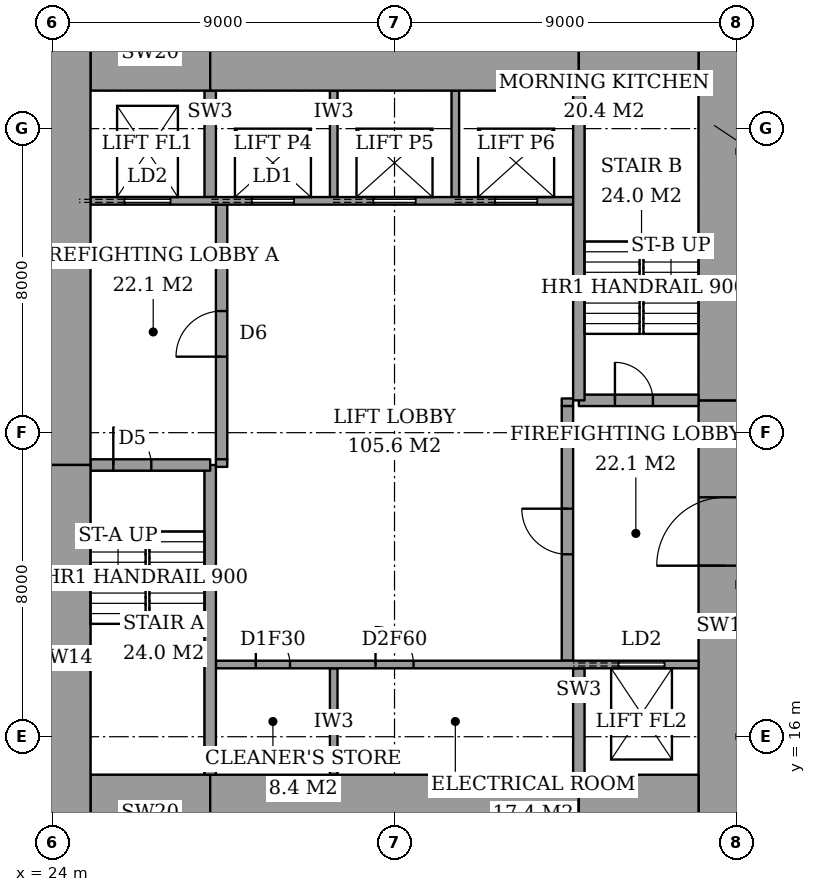
"""IFC4 building model, lengths in metres.
Left out: names, types, materials, properties, quantities, classifications, styles, units other than length and angle.
Written with IfcOpenShell. Run it as: python <this file> out.ifc"""

import sys

from ifc_helpers import new_model, si_unit, direction, frame, frame_2d, origin, place, context, subcontext, project, spatial, rectangle, extrude, element, fill, save


model = new_model("IFC4")
c1 = context("Model", 3, precision=1e-05, world=origin(), true_north=direction((0.0, 1.0)))
c2 = subcontext(c1, "Body", "Model", "MODEL_VIEW")
j1 = project(units=[si_unit("LENGTHUNIT", "METRE"), si_unit("PLANEANGLEUNIT", "RADIAN")], contexts=[c1])
p1 = place(None, origin())
s1 = spatial("IfcSite", under=j1, at=p1, CompositionType="ELEMENT")
p2 = place(p1, origin())
s2 = spatial("IfcBuilding", under=s1, at=p2, CompositionType="ELEMENT")
p3 = place(p2, frame((0.0, 0.0, 273.6)))
s3 = spatial("IfcBuildingStorey", under=s2, at=p3, CompositionType="ELEMENT", Elevation=273.6)
p4 = place(p3, frame((25.0, 14.0, 0.0), z_axis=(0.0, 0.0, 1.0), x_axis=(1.0, 0.0, 0.0)))
e1 = element("IfcWall", 1, at=p4, inside=s3, PredefinedType="SHEAR", context=c2, shape_type="SweptSolid", body=[
    extrude(rectangle(XDim=3.15, YDim=2.0, at=frame_2d((1.575, 0.0))), origin(), (0.0, 0.0, 1.0), 3.6),
])
p5 = place(p3, frame((28.15, 14.0, 0.0), z_axis=(0.0, 0.0, 1.0), x_axis=(1.0, 0.0, 0.0)))
e2 = element("IfcWall", 2, at=p5, inside=s3, PredefinedType="SHEAR", context=c2, shape_type="SweptSolid", body=[
    extrude(rectangle(XDim=9.7, YDim=2.0, at=frame_2d((4.85, 0.0))), origin(), (0.0, 0.0, 1.0), 3.6),
])
for number, where, z_axis, x_axis in (
    (3, (37.85, 14.0, 0.0), (0.0, 0.0, 1.0), (1.0, 0.0, 0.0)),
    (4, (25.0, 34.0, 0.0), (0.0, 0.0, 1.0), (1.0, 0.0, 0.0)),
):
    element("IfcWall", number, at=place(p3, frame(where, z_axis=z_axis, x_axis=x_axis)), inside=s3, PredefinedType="SHEAR", context=c2, shape_type="SweptSolid", body=[
        extrude(rectangle(XDim=3.15, YDim=2.0, at=frame_2d((1.575, 0.0))), origin(), (0.0, 0.0, 1.0), 3.6),
    ])
p6 = place(p3, frame((28.15, 34.0, 0.0), z_axis=(0.0, 0.0, 1.0), x_axis=(1.0, 0.0, 0.0)))
e5 = element("IfcWall", 5, at=p6, inside=s3, PredefinedType="SHEAR", context=c2, shape_type="SweptSolid", body=[
    extrude(rectangle(XDim=9.7, YDim=2.0, at=frame_2d((4.85, 0.0))), origin(), (0.0, 0.0, 1.0), 3.6),
])
p7 = place(p3, frame((37.85, 34.0, 0.0), z_axis=(0.0, 0.0, 1.0), x_axis=(1.0, 0.0, 0.0)))
e6 = element("IfcWall", 6, at=p7, inside=s3, PredefinedType="SHEAR", context=c2, shape_type="SweptSolid", body=[
    extrude(rectangle(XDim=3.15, YDim=2.0, at=frame_2d((1.575, 0.0))), origin(), (0.0, 0.0, 1.0), 3.6),
])
p8 = place(p3, frame((24.3, 13.0, 0.0), z_axis=(0.0, 0.0, 1.0), x_axis=(0.0, 1.0, 0.0)))
e7 = element("IfcWall", 7, at=p8, inside=s3, PredefinedType="SHEAR", context=c2, shape_type="SweptSolid", body=[
    extrude(rectangle(XDim=10.15, YDim=1.4, at=frame_2d((5.075, 0.0))), origin(), (0.0, 0.0, 1.0), 3.6),
])
p9 = place(p3, frame((24.3, 23.15, 0.0), z_axis=(0.0, 0.0, 1.0), x_axis=(0.0, 1.0, 0.0)))
e8 = element("IfcWall", 8, at=p9, inside=s3, PredefinedType="SHEAR", context=c2, shape_type="SweptSolid", body=[
    extrude(rectangle(XDim=11.85, YDim=1.4, at=frame_2d((5.925, 0.0))), origin(), (0.0, 0.0, 1.0), 3.6),
])
p10 = place(p3, frame((41.7, 13.0, 0.0), z_axis=(0.0, 0.0, 1.0), x_axis=(0.0, 1.0, 0.0)))
e9 = element("IfcWall", 9, at=p10, inside=s3, PredefinedType="SHEAR", context=c2, shape_type="SweptSolid", body=[
    extrude(rectangle(XDim=11.85, YDim=1.4, at=frame_2d((5.925, 0.0))), origin(), (0.0, 0.0, 1.0), 3.6),
])
p11 = place(p10, frame((7.5, 0.0, 0.0)))
e10 = element("IfcOpeningElement", 10, at=p11, cuts=e9, PredefinedType="OPENING", context=c2, shape_type="SweptSolid", body=[
    extrude(rectangle(XDim=1.8, YDim=2.4, at=frame_2d((0.9, 1.2))), frame((0.0, 0.71, 0.0), z_axis=(0.0, -1.0, 0.0), x_axis=(1.0, 0.0, 0.0)), (0.0, 0.0, 1.0), 1.42),
])
p12 = place(p3, frame((41.7, 24.85, 0.0), z_axis=(0.0, 0.0, 1.0), x_axis=(0.0, 1.0, 0.0)))
e11 = element("IfcWall", 11, at=p12, inside=s3, PredefinedType="SHEAR", context=c2, shape_type="SweptSolid", body=[
    extrude(rectangle(XDim=10.15, YDim=1.4, at=frame_2d((5.075, 0.0))), origin(), (0.0, 0.0, 1.0), 3.6),
])
p13 = place(p3, frame((28.15, 15.0, 0.0), z_axis=(0.0, 0.0, 1.0), x_axis=(0.0, 1.0, 0.0)))
e12 = element("IfcWall", 12, at=p13, inside=s3, PredefinedType="SHEAR", context=c2, shape_type="SweptSolid", body=[
    extrude(rectangle(XDim=8.15, YDim=0.3, at=frame_2d((4.075, 0.0))), origin(), (0.0, 0.0, 1.0), 3.6),
])
p14 = place(p3, frame((25.0, 23.15, 0.0), z_axis=(0.0, 0.0, 1.0), x_axis=(1.0, 0.0, 0.0)))
e13 = element("IfcWall", 13, at=p14, inside=s3, PredefinedType="SHEAR", context=c2, shape_type="SweptSolid", body=[
    extrude(rectangle(XDim=3.15, YDim=0.3, at=frame_2d((1.575, 0.0))), origin(), (0.0, 0.0, 1.0), 3.6),
])
p15 = place(p14, frame((0.6, 0.0, 0.0)))
e14 = element("IfcOpeningElement", 14, at=p15, cuts=e13, PredefinedType="OPENING", context=c2, shape_type="SweptSolid", body=[
    extrude(rectangle(XDim=1.0, YDim=2.1, at=frame_2d((0.5, 1.05))), frame((0.0, 0.16, 0.0), z_axis=(0.0, -1.0, 0.0), x_axis=(1.0, 0.0, 0.0)), (0.0, 0.0, 1.0), 0.32),
])
p16 = place(p3, frame((37.85, 24.85, 0.0), z_axis=(0.0, 0.0, 1.0), x_axis=(0.0, 1.0, 0.0)))
e15 = element("IfcWall", 15, at=p16, inside=s3, PredefinedType="SHEAR", context=c2, shape_type="SweptSolid", body=[
    extrude(rectangle(XDim=8.15, YDim=0.3, at=frame_2d((4.075, 0.0))), origin(), (0.0, 0.0, 1.0), 3.6),
])
p17 = place(p3, frame((37.85, 24.85, 0.0), z_axis=(0.0, 0.0, 1.0), x_axis=(1.0, 0.0, 0.0)))
e16 = element("IfcWall", 16, at=p17, inside=s3, PredefinedType="SHEAR", context=c2, shape_type="SweptSolid", body=[
    extrude(rectangle(XDim=3.15, YDim=0.3, at=frame_2d((1.575, 0.0))), origin(), (0.0, 0.0, 1.0), 3.6),
])
p18 = place(p17, frame((0.95, 0.0, 0.0)))
e17 = element("IfcOpeningElement", 17, at=p18, cuts=e16, PredefinedType="OPENING", context=c2, shape_type="SweptSolid", body=[
    extrude(rectangle(XDim=1.0, YDim=2.1, at=frame_2d((0.5, 1.05))), frame((0.0, 0.16, 0.0), z_axis=(0.0, -1.0, 0.0), x_axis=(1.0, 0.0, 0.0)), (0.0, 0.0, 1.0), 0.32),
])
p19 = place(p3, frame((28.45, 23.3, 0.0), z_axis=(0.0, 0.0, 1.0), x_axis=(0.0, 1.0, 0.0)))
e18 = element("IfcWall", 18, at=p19, inside=s3, PredefinedType="PARTITIONING", context=c2, shape_type="SweptSolid", body=[
    extrude(rectangle(XDim=6.7, YDim=0.3, at=frame_2d((3.35, 0.0))), origin(), (0.0, 0.0, 1.0), 3.6),
])
p20 = place(p19, frame((2.7, 0.0, 0.0)))
e19 = element("IfcOpeningElement", 19, at=p20, cuts=e18, PredefinedType="OPENING", context=c2, shape_type="SweptSolid", body=[
    extrude(rectangle(XDim=1.2, YDim=2.1, at=frame_2d((0.6, 1.05))), frame((0.0, 0.16, 0.0), z_axis=(0.0, -1.0, 0.0), x_axis=(1.0, 0.0, 0.0)), (0.0, 0.0, 1.0), 0.32),
])
p21 = place(p3, frame((37.55, 18.0, 0.0), z_axis=(0.0, 0.0, 1.0), x_axis=(0.0, 1.0, 0.0)))
e20 = element("IfcWall", 20, at=p21, inside=s3, PredefinedType="PARTITIONING", context=c2, shape_type="SweptSolid", body=[
    extrude(rectangle(XDim=6.7, YDim=0.3, at=frame_2d((3.35, 0.0))), origin(), (0.0, 0.0, 1.0), 3.6),
])
p22 = place(p21, frame((2.8, 0.0, 0.0)))
e21 = element("IfcOpeningElement", 21, at=p22, cuts=e20, PredefinedType="OPENING", context=c2, shape_type="SweptSolid", body=[
    extrude(rectangle(XDim=1.2, YDim=2.1, at=frame_2d((0.6, 1.05))), frame((0.0, 0.16, 0.0), z_axis=(0.0, -1.0, 0.0), x_axis=(1.0, 0.0, 0.0)), (0.0, 0.0, 1.0), 0.32),
])
p23 = place(p3, frame((28.3, 17.9, 0.0), z_axis=(0.0, 0.0, 1.0), x_axis=(1.0, 0.0, 0.0)))
e22 = element("IfcWall", 22, at=p23, inside=s3, PredefinedType="PARTITIONING", context=c2, shape_type="SweptSolid", body=[
    extrude(rectangle(XDim=12.7, YDim=0.2, at=frame_2d((6.35, 0.0))), origin(), (0.0, 0.0, 1.0), 3.6),
])
p24 = place(p23, frame((1.05, 0.0, 0.0)))
e23 = element("IfcOpeningElement", 23, at=p24, cuts=e22, PredefinedType="OPENING", context=c2, shape_type="SweptSolid", body=[
    extrude(rectangle(XDim=0.9, YDim=2.1, at=frame_2d((0.45, 1.05))), frame((0.0, 0.11, 0.0), z_axis=(0.0, -1.0, 0.0), x_axis=(1.0, 0.0, 0.0)), (0.0, 0.0, 1.0), 0.22),
])
p25 = place(p23, frame((4.2, 0.0, 0.0)))
e24 = element("IfcOpeningElement", 24, at=p25, cuts=e22, PredefinedType="OPENING", context=c2, shape_type="SweptSolid", body=[
    extrude(rectangle(XDim=1.0, YDim=2.1, at=frame_2d((0.5, 1.05))), frame((0.0, 0.11, 0.0), z_axis=(0.0, -1.0, 0.0), x_axis=(1.0, 0.0, 0.0)), (0.0, 0.0, 1.0), 0.22),
])
p26 = place(p23, frame((10.6, 0.0, 0.0)))
e25 = element("IfcOpeningElement", 25, at=p26, cuts=e22, PredefinedType="OPENING", context=c2, shape_type="SweptSolid", body=[
    extrude(rectangle(XDim=1.2, YDim=2.1, at=frame_2d((0.6, 1.05))), frame((0.0, 0.11, 0.0), z_axis=(0.0, -1.0, 0.0), x_axis=(1.0, 0.0, 0.0)), (0.0, 0.0, 1.0), 0.22),
])
p27 = place(p3, frame((25.0, 30.1, 0.0), z_axis=(0.0, 0.0, 1.0), x_axis=(1.0, 0.0, 0.0)))
e26 = element("IfcWall", 26, at=p27, inside=s3, PredefinedType="PARTITIONING", context=c2, shape_type="SweptSolid", body=[
    extrude(rectangle(XDim=12.7, YDim=0.2, at=frame_2d((6.35, 0.0))), origin(), (0.0, 0.0, 1.0), 3.6),
])
p28 = place(p27, frame((4.25, 0.0, 0.0)))
e27 = element("IfcOpeningElement", 27, at=p28, cuts=e26, PredefinedType="OPENING", context=c2, shape_type="SweptSolid", body=[
    extrude(rectangle(XDim=1.1, YDim=2.1, at=frame_2d((0.55, 1.05))), frame((0.0, 0.11, 0.0), z_axis=(0.0, -1.0, 0.0), x_axis=(1.0, 0.0, 0.0)), (0.0, 0.0, 1.0), 0.22),
])
p29 = place(p27, frame((7.45, 0.0, 0.0)))
e28 = element("IfcOpeningElement", 28, at=p29, cuts=e26, PredefinedType="OPENING", context=c2, shape_type="SweptSolid", body=[
    extrude(rectangle(XDim=1.1, YDim=2.1, at=frame_2d((0.55, 1.05))), frame((0.0, 0.11, 0.0), z_axis=(0.0, -1.0, 0.0), x_axis=(1.0, 0.0, 0.0)), (0.0, 0.0, 1.0), 0.22),
])
p30 = place(p27, frame((10.65, 0.0, 0.0)))
e29 = element("IfcOpeningElement", 29, at=p30, cuts=e26, PredefinedType="OPENING", context=c2, shape_type="SweptSolid", body=[
    extrude(rectangle(XDim=1.1, YDim=2.1, at=frame_2d((0.55, 1.05))), frame((0.0, 0.11, 0.0), z_axis=(0.0, -1.0, 0.0), x_axis=(1.0, 0.0, 0.0)), (0.0, 0.0, 1.0), 0.22),
])
p31 = place(p27, frame((0.9, 0.0, 0.0)))
e30 = element("IfcOpeningElement", 30, at=p31, cuts=e26, PredefinedType="OPENING", context=c2, shape_type="SweptSolid", body=[
    extrude(rectangle(XDim=1.2, YDim=2.1, at=frame_2d((0.6, 1.05))), frame((0.0, 0.11, 0.0), z_axis=(0.0, -1.0, 0.0), x_axis=(1.0, 0.0, 0.0)), (0.0, 0.0, 1.0), 0.22),
])
p32 = place(p3, frame((31.4, 15.0, 0.0), z_axis=(0.0, 0.0, 1.0), x_axis=(0.0, 1.0, 0.0)))
e31 = element("IfcWall", 31, at=p32, inside=s3, PredefinedType="PARTITIONING", context=c2, shape_type="SweptSolid", body=[
    extrude(rectangle(XDim=2.8, YDim=0.2, at=frame_2d((1.4, 0.0))), origin(), (0.0, 0.0, 1.0), 3.6),
])
p33 = place(p3, frame((37.85, 15.0, 0.0), z_axis=(0.0, 0.0, 1.0), x_axis=(0.0, 1.0, 0.0)))
e32 = element("IfcWall", 32, at=p33, inside=s3, PredefinedType="SHEAR", context=c2, shape_type="SweptSolid", body=[
    extrude(rectangle(XDim=2.8, YDim=0.3, at=frame_2d((1.4, 0.0))), origin(), (0.0, 0.0, 1.0), 3.6),
])
for number, where, z_axis, x_axis in (
    (33, (31.4, 30.2, 0.0), (0.0, 0.0, 1.0), (0.0, 1.0, 0.0)),
    (34, (34.6, 30.2, 0.0), (0.0, 0.0, 1.0), (0.0, 1.0, 0.0)),
):
    element("IfcWall", number, at=place(p3, frame(where, z_axis=z_axis, x_axis=x_axis)), inside=s3, PredefinedType="PARTITIONING", context=c2, shape_type="SweptSolid", body=[
        extrude(rectangle(XDim=2.8, YDim=0.2, at=frame_2d((1.4, 0.0))), origin(), (0.0, 0.0, 1.0), 3.6),
    ])
p34 = place(p3, frame((28.15, 30.2, 0.0), z_axis=(0.0, 0.0, 1.0), x_axis=(0.0, 1.0, 0.0)))
e35 = element("IfcWall", 35, at=p34, inside=s3, PredefinedType="SHEAR", context=c2, shape_type="SweptSolid", body=[
    extrude(rectangle(XDim=2.8, YDim=0.3, at=frame_2d((1.4, 0.0))), origin(), (0.0, 0.0, 1.0), 3.6),
])
for number, where, z_axis, x_axis in (
    (36, (28.3, 23.2, 0.0), (0.0, 0.0, 1.0), (1.0, 0.0, 0.0)),
    (37, (37.4, 24.8, 0.0), (0.0, 0.0, 1.0), (1.0, 0.0, 0.0)),
):
    element("IfcWall", number, at=place(p3, frame(where, z_axis=z_axis, x_axis=x_axis)), inside=s3, PredefinedType="PARTITIONING", context=c2, shape_type="SweptSolid", body=[
        extrude(rectangle(XDim=0.3, YDim=0.2, at=frame_2d((0.15, 0.0))), origin(), (0.0, 0.0, 1.0), 3.6),
    ])
p35 = place(p15, origin())
e38 = element("IfcDoor", 38, at=p35, inside=s3, OperationType="SINGLE_SWING_RIGHT", PredefinedType="DOOR", context=c2, shape_type="SweptSolid", body=[
    extrude(rectangle(XDim=1.0, YDim=2.1, at=frame_2d((0.5, 1.05))), frame((0.0, 0.025, 0.0), z_axis=(0.0, -1.0, 0.0), x_axis=(1.0, 0.0, 0.0)), (0.0, 0.0, 1.0), 0.05),
])
fill(e14, e38)
p36 = place(p18, origin())
e39 = element("IfcDoor", 39, at=p36, inside=s3, OperationType="SINGLE_SWING_RIGHT", PredefinedType="DOOR", context=c2, shape_type="SweptSolid", body=[
    extrude(rectangle(XDim=1.0, YDim=2.1, at=frame_2d((0.5, 1.05))), frame((0.0, 0.025, 0.0), z_axis=(0.0, -1.0, 0.0), x_axis=(1.0, 0.0, 0.0)), (0.0, 0.0, 1.0), 0.05),
])
fill(e17, e39)
p37 = place(p20, origin())
e40 = element("IfcDoor", 40, at=p37, inside=s3, OperationType="SINGLE_SWING_RIGHT", PredefinedType="DOOR", context=c2, shape_type="SweptSolid", body=[
    extrude(rectangle(XDim=1.2, YDim=2.1, at=frame_2d((0.6, 1.05))), frame((0.0, 0.025, 0.0), z_axis=(0.0, -1.0, 0.0), x_axis=(1.0, 0.0, 0.0)), (0.0, 0.0, 1.0), 0.05),
])
fill(e19, e40)
p38 = place(p22, origin())
e41 = element("IfcDoor", 41, at=p38, inside=s3, OperationType="SINGLE_SWING_LEFT", PredefinedType="DOOR", context=c2, shape_type="SweptSolid", body=[
    extrude(rectangle(XDim=1.2, YDim=2.1, at=frame_2d((0.6, 1.05))), frame((0.0, 0.025, 0.0), z_axis=(0.0, -1.0, 0.0), x_axis=(1.0, 0.0, 0.0)), (0.0, 0.0, 1.0), 0.05),
])
fill(e21, e41)
p39 = place(p11, origin())
e42 = element("IfcDoor", 42, at=p39, inside=s3, OperationType="DOUBLE_DOOR_DOUBLE_SWING", PredefinedType="DOOR", context=c2, shape_type="SweptSolid", body=[
    extrude(rectangle(XDim=1.8, YDim=2.4, at=frame_2d((0.9, 1.2))), frame((0.0, 0.025, 0.0), z_axis=(0.0, -1.0, 0.0), x_axis=(1.0, 0.0, 0.0)), (0.0, 0.0, 1.0), 0.05),
])
fill(e10, e42)
p40 = place(p24, origin())
e43 = element("IfcDoor", 43, at=p40, inside=s3, OperationType="SINGLE_SWING_RIGHT", PredefinedType="DOOR", context=c2, shape_type="SweptSolid", body=[
    extrude(rectangle(XDim=0.9, YDim=2.1, at=frame_2d((0.45, 1.05))), frame((0.0, 0.025, 0.0), z_axis=(0.0, -1.0, 0.0), x_axis=(1.0, 0.0, 0.0)), (0.0, 0.0, 1.0), 0.05),
])
fill(e23, e43)
p41 = place(p25, origin())
e44 = element("IfcDoor", 44, at=p41, inside=s3, OperationType="SINGLE_SWING_RIGHT", PredefinedType="DOOR", context=c2, shape_type="SweptSolid", body=[
    extrude(rectangle(XDim=1.0, YDim=2.1, at=frame_2d((0.5, 1.05))), frame((0.0, 0.025, 0.0), z_axis=(0.0, -1.0, 0.0), x_axis=(1.0, 0.0, 0.0)), (0.0, 0.0, 1.0), 0.05),
])
fill(e24, e44)
p42 = place(p28, origin())
e45 = element("IfcDoor", 45, at=p42, inside=s3, OperationType="SLIDING_TO_LEFT", PredefinedType="DOOR", context=c2, shape_type="SweptSolid", body=[
    extrude(rectangle(XDim=1.1, YDim=2.1, at=frame_2d((0.55, 1.05))), frame((0.0, 0.025, 0.0), z_axis=(0.0, -1.0, 0.0), x_axis=(1.0, 0.0, 0.0)), (0.0, 0.0, 1.0), 0.05),
])
fill(e27, e45)
p43 = place(p29, origin())
e46 = element("IfcDoor", 46, at=p43, inside=s3, OperationType="SLIDING_TO_LEFT", PredefinedType="DOOR", context=c2, shape_type="SweptSolid", body=[
    extrude(rectangle(XDim=1.1, YDim=2.1, at=frame_2d((0.55, 1.05))), frame((0.0, 0.025, 0.0), z_axis=(0.0, -1.0, 0.0), x_axis=(1.0, 0.0, 0.0)), (0.0, 0.0, 1.0), 0.05),
])
fill(e28, e46)
p44 = place(p30, origin())
e47 = element("IfcDoor", 47, at=p44, inside=s3, OperationType="SLIDING_TO_LEFT", PredefinedType="DOOR", context=c2, shape_type="SweptSolid", body=[
    extrude(rectangle(XDim=1.1, YDim=2.1, at=frame_2d((0.55, 1.05))), frame((0.0, 0.025, 0.0), z_axis=(0.0, -1.0, 0.0), x_axis=(1.0, 0.0, 0.0)), (0.0, 0.0, 1.0), 0.05),
])
fill(e29, e47)
p45 = place(p31, origin())
e48 = element("IfcDoor", 48, at=p45, inside=s3, OperationType="SLIDING_TO_LEFT", PredefinedType="DOOR", context=c2, shape_type="SweptSolid", body=[
    extrude(rectangle(XDim=1.2, YDim=2.1, at=frame_2d((0.6, 1.05))), frame((0.0, 0.025, 0.0), z_axis=(0.0, -1.0, 0.0), x_axis=(1.0, 0.0, 0.0)), (0.0, 0.0, 1.0), 0.05),
])
fill(e30, e48)
p46 = place(p26, origin())
e49 = element("IfcDoor", 49, at=p46, inside=s3, OperationType="SLIDING_TO_LEFT", PredefinedType="DOOR", context=c2, shape_type="SweptSolid", body=[
    extrude(rectangle(XDim=1.2, YDim=2.1, at=frame_2d((0.6, 1.05))), frame((0.0, 0.025, 0.0), z_axis=(0.0, -1.0, 0.0), x_axis=(1.0, 0.0, 0.0)), (0.0, 0.0, 1.0), 0.05),
])
fill(e25, e49)
save(model, sys.argv[1])
